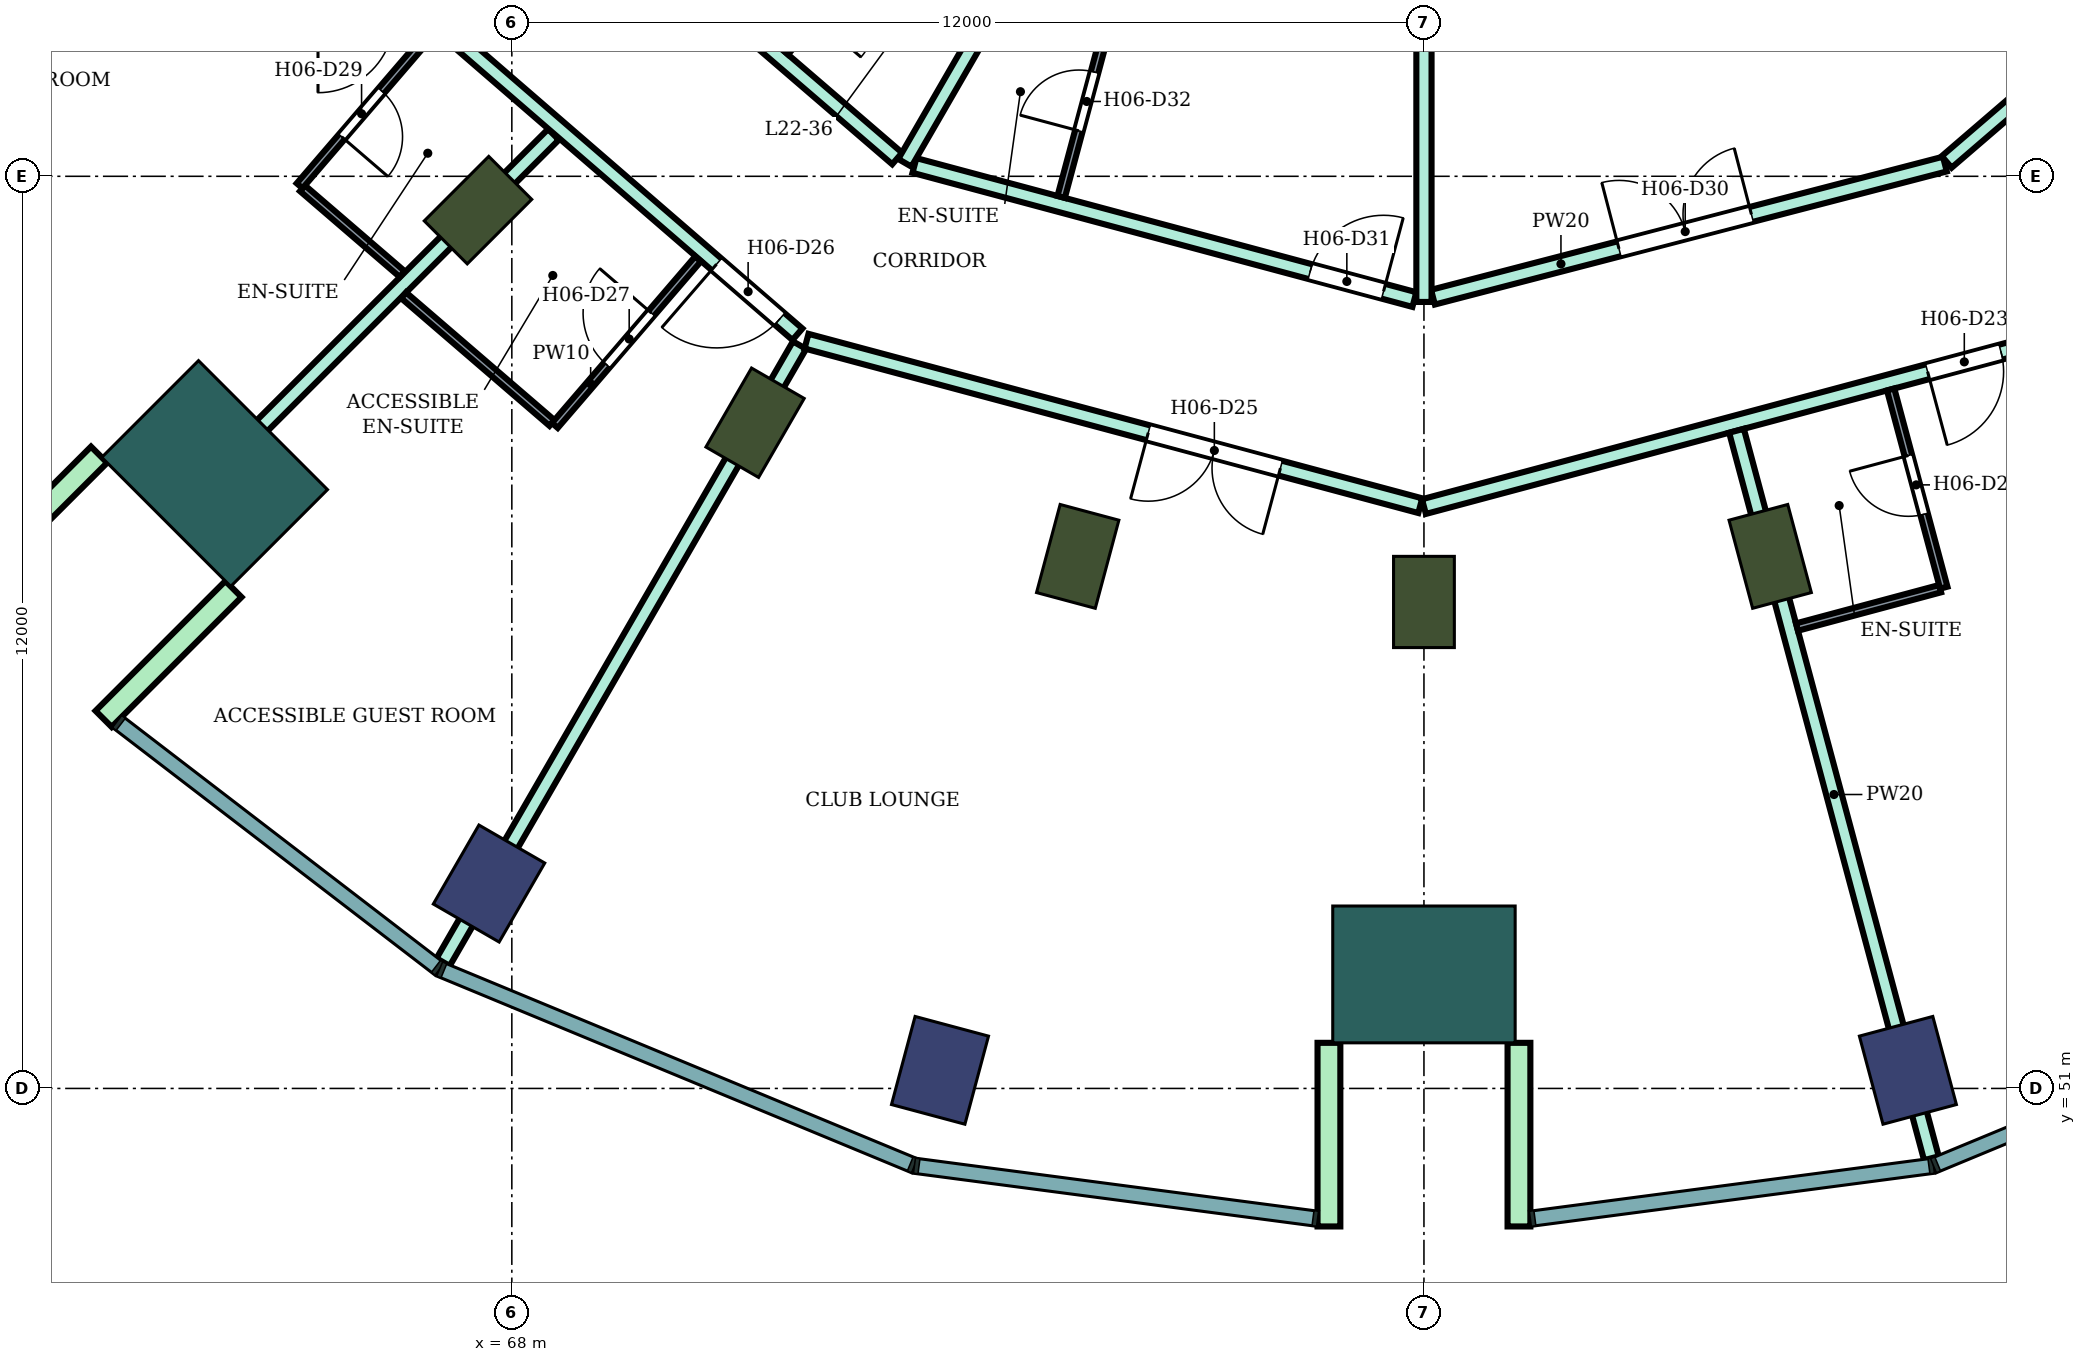
"""IFC4 building model, lengths in metres.
Left out: names, types, materials, properties, quantities, classifications, styles, units other than length and angle.
Written with IfcOpenShell. Run it as: python <this file> out.ifc"""

import sys

from ifc_helpers import new_model, si_unit, direction, frame, frame_2d, origin, origin_2d, place, context, subcontext, project, spatial, rectangle, extrude, element, fill, save


model = new_model("IFC4")
c1 = context("Model", 3, precision=1e-05, world=origin(), true_north=direction((0.0, 1.0)))
c2 = subcontext(c1, "Body", "Model", "MODEL_VIEW")
j1 = project(units=[si_unit("LENGTHUNIT", "METRE"), si_unit("PLANEANGLEUNIT", "RADIAN")], contexts=[c1])
p1 = place(None, origin())
s1 = spatial("IfcSite", under=j1, at=p1, CompositionType="ELEMENT")
p2 = place(p1, origin())
s2 = spatial("IfcBuilding", under=s1, at=p2, CompositionType="ELEMENT")
p3 = place(p2, frame((0.0, 0.0, 97.6)))
s3 = spatial("IfcBuildingStorey", under=s2, at=p3, CompositionType="ELEMENT", Elevation=97.6)
for number, where, z_axis, x_axis in (
    (1, (67.7, 53.696, 0.0), (0.0, 0.0, 1.0), (-0.5, -0.866, 0.0)),
    (2, (73.633, 51.238, 0.0), (0.0, 0.0, 1.0), (-0.259, -0.966, 0.0)),
    (3, (86.367, 51.238, 0.0), (0.0, 0.0, 1.0), (0.259, -0.966, 0.0)),
):
    element("IfcColumn", number, at=place(p3, frame(where, z_axis=z_axis, x_axis=x_axis)), inside=s3, PredefinedType="COLUMN", context=c2, shape_type="SweptSolid", body=[
        extrude(rectangle(XDim=1.2, YDim=1.0, at=origin_2d()), origin(), (0.0, 0.0, 1.0), 3.8),
    ])
for number, where, z_axis, x_axis in (
    (4, (67.555, 62.555, 0.0), (0.0, 0.0, 1.0), (-0.707, -0.707, 0.0)),
    (5, (71.2, 59.758, 0.0), (0.0, 0.0, 1.0), (-0.5, -0.866, 0.0)),
    (6, (75.445, 58.0, 0.0), (0.0, 0.0, 1.0), (-0.259, -0.966, 0.0)),
    (7, (80.0, 57.4, 0.0), (0.0, 0.0, 1.0), (0.0, -1.0, 0.0)),
    (8, (84.555, 58.0, 0.0), (0.0, 0.0, 1.0), (0.259, -0.966, 0.0)),
):
    element("IfcColumn", number, at=place(p3, frame(where, z_axis=z_axis, x_axis=x_axis)), inside=s3, PredefinedType="COLUMN", context=c2, shape_type="SweptSolid", body=[
        extrude(rectangle(XDim=1.2, YDim=0.8, at=origin_2d()), origin(), (0.0, 0.0, 1.0), 3.8),
    ])
for number, where, z_axis, x_axis in (
    (9, (64.09, 59.09, 0.0), (0.0, 0.0, 1.0), (-0.707, -0.707, 0.0)),
    (10, (80.0, 52.5, 0.0), (0.0, 0.0, 1.0), (0.0, -1.0, 0.0)),
):
    element("IfcColumn", number, at=place(p3, frame(where, z_axis=z_axis, x_axis=x_axis)), inside=s3, PredefinedType="COLUMN", context=c2, shape_type="SweptSolid", body=[
        extrude(rectangle(XDim=1.8, YDim=2.4, at=origin_2d()), origin(), (0.0, 0.0, 1.0), 3.8),
    ])
for number, where, z_axis, x_axis in (
    (11, (62.57, 59.338, 0.0), (0.0, 0.0, 1.0), (-0.707, -0.707, 0.0)),
    (12, (64.338, 57.57, 0.0), (0.0, 0.0, 1.0), (-0.707, -0.707, 0.0)),
    (13, (78.75, 51.6, 0.0), (0.0, 0.0, 1.0), (0.0, -1.0, 0.0)),
    (14, (81.25, 51.6, 0.0), (0.0, 0.0, 1.0), (0.0, -1.0, 0.0)),
):
    element("IfcWall", number, at=place(p3, frame(where, z_axis=z_axis, x_axis=x_axis)), inside=s3, PredefinedType="NOTDEFINED", context=c2, shape_type="SweptSolid", body=[
        extrude(rectangle(XDim=2.416, YDim=0.3, at=frame_2d((1.208, 0.0))), origin(), (0.0, 0.0, 1.0), 3.8),
    ])
p4 = place(p3, frame((63.594, 58.598, 0.0), z_axis=(0.0, 0.0, 1.0), x_axis=(0.707228748718, 0.706984792613, 0.0)))
e15 = element("IfcWall", 15, at=p4, inside=s3, PredefinedType="PARTITIONING", context=c2, shape_type="SweptSolid", body=[
    extrude(rectangle(XDim=7.005, YDim=0.2, at=frame_2d((3.503, 0.0))), origin(), (0.0, 0.0, 1.0), 3.35),
])
p5 = place(p3, frame((67.079, 64.968, 0.0), z_axis=(0.0, 0.0, 1.0), x_axis=(0.756371089567, -0.654142778656, 0.0)))
e16 = element("IfcWall", 16, at=p5, inside=s3, PredefinedType="PARTITIONING", context=c2, shape_type="SweptSolid", body=[
    extrude(rectangle(XDim=6.185, YDim=0.2, at=frame_2d((3.093, 0.0))), origin(), (0.0, 0.0, 1.0), 3.35),
])
p6 = place(p5, frame((4.778, 0.0, 0.0)))
e17 = element("IfcOpeningElement", 17, at=p6, cuts=e16, PredefinedType="OPENING", context=c2, shape_type="SweptSolid", body=[
    extrude(rectangle(XDim=1.1, YDim=2.1, at=frame_2d((0.55, 1.05))), frame((0.0, 0.11, 0.0), z_axis=(0.0, -1.0, 0.0), x_axis=(1.0, 0.0, 0.0)), (0.0, 0.0, 1.0), 0.22),
])
p7 = place(p3, frame((67.096, 52.662, 0.0), z_axis=(0.0, 0.0, 1.0), x_axis=(0.500222922337, 0.865896661253, 0.0)))
e18 = element("IfcWall", 18, at=p7, inside=s3, PredefinedType="PARTITIONING", context=c2, shape_type="SweptSolid", body=[
    extrude(rectangle(XDim=9.374, YDim=0.2, at=frame_2d((4.687, 0.0))), origin(), (0.0, 0.0, 1.0), 3.35),
])
p8 = place(p3, frame((69.158, 66.6, 0.0), z_axis=(0.0, 0.0, 1.0), x_axis=(0.757976058094, -0.652282373943, 0.0)))
e19 = element("IfcWall", 19, at=p8, inside=s3, PredefinedType="PARTITIONING", context=c2, shape_type="SweptSolid", body=[
    extrude(rectangle(XDim=5.16, YDim=0.2, at=frame_2d((2.58, 0.0))), origin(), (0.0, 0.0, 1.0), 3.35),
])
p9 = place(p8, frame((1.6, 0.0, 0.0)))
e20 = element("IfcOpeningElement", 20, at=p9, cuts=e19, PredefinedType="OPENING", context=c2, shape_type="SweptSolid", body=[
    extrude(rectangle(XDim=1.0, YDim=2.1, at=frame_2d((0.5, 1.05))), frame((0.0, 0.11, 0.0), z_axis=(0.0, -1.0, 0.0), x_axis=(1.0, 0.0, 0.0)), (0.0, 0.0, 1.0), 0.22),
])
p10 = place(p3, frame((71.877, 60.831, 0.0), z_axis=(0.0, 0.0, 1.0), x_axis=(0.965905026676, -0.258896657842, 0.0)))
e21 = element("IfcWall", 21, at=p10, inside=s3, PredefinedType="PARTITIONING", context=c2, shape_type="SweptSolid", body=[
    extrude(rectangle(XDim=8.36, YDim=0.2, at=frame_2d((4.18, 0.0))), origin(), (0.0, 0.0, 1.0), 3.35),
])
p11 = place(p10, frame((4.655, 0.0, 0.0)))
e22 = element("IfcOpeningElement", 22, at=p11, cuts=e21, PredefinedType="OPENING", context=c2, shape_type="SweptSolid", body=[
    extrude(rectangle(XDim=1.8, YDim=2.1, at=frame_2d((0.9, 1.05))), frame((0.0, 0.11, 0.0), z_axis=(0.0, -1.0, 0.0), x_axis=(1.0, 0.0, 0.0)), (0.0, 0.0, 1.0), 0.22),
])
p12 = place(p3, frame((73.297, 63.143, 0.0), z_axis=(0.0, 0.0, 1.0), x_axis=(0.965859030528, -0.25906820173, 0.0)))
e23 = element("IfcWall", 23, at=p12, inside=s3, PredefinedType="PARTITIONING", context=c2, shape_type="SweptSolid", body=[
    extrude(rectangle(XDim=6.81, YDim=0.2, at=frame_2d((3.405, 0.0))), origin(), (0.0, 0.0, 1.0), 3.35),
])
p13 = place(p12, frame((5.39, 0.0, 0.0)))
e24 = element("IfcOpeningElement", 24, at=p13, cuts=e23, PredefinedType="OPENING", context=c2, shape_type="SweptSolid", body=[
    extrude(rectangle(XDim=1.0, YDim=2.1, at=frame_2d((0.5, 1.05))), frame((0.0, 0.11, 0.0), z_axis=(0.0, -1.0, 0.0), x_axis=(1.0, 0.0, 0.0)), (0.0, 0.0, 1.0), 0.22),
])
p14 = place(p3, frame((73.171, 63.177, 0.0), z_axis=(0.0, 0.0, 1.0), x_axis=(0.500257106344, 0.865876912472, 0.0)))
e25 = element("IfcWall", 25, at=p14, inside=s3, PredefinedType="PARTITIONING", context=c2, shape_type="SweptSolid", body=[
    extrude(rectangle(XDim=5.955, YDim=0.2, at=frame_2d((2.978, 0.0))), origin(), (0.0, 0.0, 1.0), 3.35),
])
p15 = place(p3, frame((80.119, 61.41, 0.0), z_axis=(0.0, 0.0, 1.0), x_axis=(0.967823361235, 0.251630565408, 0.0)))
e26 = element("IfcWall", 26, at=p15, inside=s3, PredefinedType="PARTITIONING", context=c2, shape_type="SweptSolid", body=[
    extrude(rectangle(XDim=6.958, YDim=0.2, at=frame_2d((3.479, 0.0))), origin(), (0.0, 0.0, 1.0), 3.35),
])
p16 = place(p15, frame((2.529, 0.0, 0.0)))
e27 = element("IfcOpeningElement", 27, at=p16, cuts=e26, PredefinedType="OPENING", context=c2, shape_type="SweptSolid", body=[
    extrude(rectangle(XDim=1.8, YDim=2.1, at=frame_2d((0.9, 1.05))), frame((0.0, 0.11, 0.0), z_axis=(0.0, -1.0, 0.0), x_axis=(1.0, 0.0, 0.0)), (0.0, 0.0, 1.0), 0.22),
])
p17 = place(p3, frame((80.0, 58.655, 0.0), z_axis=(0.0, 0.0, 1.0), x_axis=(0.965967338894, 0.258664068224, 0.0)))
e28 = element("IfcWall", 28, at=p17, inside=s3, PredefinedType="PARTITIONING", context=c2, shape_type="SweptSolid", body=[
    extrude(rectangle(XDim=8.36, YDim=0.2, at=frame_2d((4.18, 0.0))), origin(), (0.0, 0.0, 1.0), 3.35),
])
p18 = place(p17, frame((6.86, 0.0, 0.0)))
e29 = element("IfcOpeningElement", 29, at=p18, cuts=e28, PredefinedType="OPENING", context=c2, shape_type="SweptSolid", body=[
    extrude(rectangle(XDim=1.0, YDim=2.1, at=frame_2d((0.5, 1.05))), frame((0.0, 0.11, 0.0), z_axis=(0.0, -1.0, 0.0), x_axis=(1.0, 0.0, 0.0)), (0.0, 0.0, 1.0), 0.22),
])
p19 = place(p3, frame((80.0, 61.347, 0.0), z_axis=(0.0, 0.0, 1.0), x_axis=(0.0, 1.0, 0.0)))
e30 = element("IfcWall", 30, at=p19, inside=s3, PredefinedType="PARTITIONING", context=c2, shape_type="SweptSolid", body=[
    extrude(rectangle(XDim=5.953, YDim=0.2, at=frame_2d((2.977, 0.0))), origin(), (0.0, 0.0, 1.0), 3.35),
])
p20 = place(p3, frame((84.112, 59.652, 0.0), z_axis=(0.0, 0.0, 1.0), x_axis=(0.258792739659, -0.965932874428, 0.0)))
e31 = element("IfcWall", 31, at=p20, inside=s3, PredefinedType="PARTITIONING", context=c2, shape_type="SweptSolid", body=[
    extrude(rectangle(XDim=9.908, YDim=0.2, at=frame_2d((4.954, 0.0))), origin(), (0.0, 0.0, 1.0), 3.35),
])
p21 = place(p3, frame((86.877, 63.189, 0.0), z_axis=(0.0, 0.0, 1.0), x_axis=(0.758088707506, 0.652151448325, 0.0)))
e32 = element("IfcWall", 32, at=p21, inside=s3, PredefinedType="PARTITIONING", context=c2, shape_type="SweptSolid", body=[
    extrude(rectangle(XDim=5.229, YDim=0.2, at=frame_2d((2.615, 0.0))), origin(), (0.0, 0.0, 1.0), 3.35),
])
p22 = place(p3, frame((65.246, 62.842, 0.0), z_axis=(0.0, 0.0, 1.0), x_axis=(0.758030338995, -0.652219292234, 0.0)))
e33 = element("IfcWall", 33, at=p22, inside=s3, PredefinedType="PARTITIONING", context=c2, shape_type="SweptSolid", body=[
    extrude(rectangle(XDim=1.73, YDim=0.1, at=frame_2d((0.865, 0.0))), origin(), (0.0, 0.0, 1.0), 3.35),
])
p23 = place(p3, frame((65.208, 62.875, 0.0), z_axis=(0.0, 0.0, 1.0), x_axis=(0.65205430601, 0.758172264076, 0.0)))
e34 = element("IfcWall", 34, at=p23, inside=s3, PredefinedType="PARTITIONING", context=c2, shape_type="SweptSolid", body=[
    extrude(rectangle(XDim=2.8, YDim=0.1, at=frame_2d((1.4, 0.0))), origin(), (0.0, 0.0, 1.0), 3.35),
])
p24 = place(p23, frame((0.85, 0.0, 0.0)))
e35 = element("IfcOpeningElement", 35, at=p24, cuts=e34, PredefinedType="OPENING", context=c2, shape_type="SweptSolid", body=[
    extrude(rectangle(XDim=0.8, YDim=2.1, at=frame_2d((0.4, 1.05))), frame((0.0, 0.06, 0.0), z_axis=(0.0, -1.0, 0.0), x_axis=(1.0, 0.0, 0.0)), (0.0, 0.0, 1.0), 0.12),
])
p25 = place(p3, frame((66.576, 61.435, 0.0), z_axis=(0.0, 0.0, 1.0), x_axis=(0.757970550281, -0.652288774169, 0.0)))
e36 = element("IfcWall", 36, at=p25, inside=s3, PredefinedType="PARTITIONING", context=c2, shape_type="SweptSolid", body=[
    extrude(rectangle(XDim=2.576, YDim=0.1, at=frame_2d((1.288, 0.0))), origin(), (0.0, 0.0, 1.0), 3.35),
])
p26 = place(p3, frame((68.566, 59.722, 0.0), z_axis=(0.0, 0.0, 1.0), x_axis=(0.65193146671, 0.758277892803, 0.0)))
e37 = element("IfcWall", 37, at=p26, inside=s3, PredefinedType="PARTITIONING", context=c2, shape_type="SweptSolid", body=[
    extrude(rectangle(XDim=2.89, YDim=0.1, at=frame_2d((1.445, 0.0))), origin(), (0.0, 0.0, 1.0), 3.35),
])
p27 = place(p26, frame((1.05, 0.0, 0.0)))
e38 = element("IfcOpeningElement", 38, at=p27, cuts=e37, PredefinedType="OPENING", context=c2, shape_type="SweptSolid", body=[
    extrude(rectangle(XDim=0.9, YDim=2.1, at=frame_2d((0.45, 1.05))), frame((0.0, 0.06, 0.0), z_axis=(0.0, -1.0, 0.0), x_axis=(1.0, 0.0, 0.0)), (0.0, 0.0, 1.0), 0.12),
])
p28 = place(p3, frame((71.596, 64.635, 0.0), z_axis=(0.0, 0.0, 1.0), x_axis=(0.652285007511, 0.757973791748, 0.0)))
e39 = element("IfcWall", 39, at=p28, inside=s3, PredefinedType="PARTITIONING", context=c2, shape_type="SweptSolid", body=[
    extrude(rectangle(XDim=2.65, YDim=0.1, at=frame_2d((1.325, 0.0))), origin(), (0.0, 0.0, 1.0), 3.35),
])
p29 = place(p28, frame((0.6, 0.0, 0.0)))
e40 = element("IfcOpeningElement", 40, at=p29, cuts=e39, PredefinedType="OPENING", context=c2, shape_type="SweptSolid", body=[
    extrude(rectangle(XDim=0.8, YDim=2.1, at=frame_2d((0.4, 1.05))), frame((0.0, 0.06, 0.0), z_axis=(0.0, -1.0, 0.0), x_axis=(1.0, 0.0, 0.0)), (0.0, 0.0, 1.0), 0.12),
])
p30 = place(p3, frame((75.227, 62.729, 0.0), z_axis=(0.0, 0.0, 1.0), x_axis=(0.258945475746, 0.965891940432, 0.0)))
e41 = element("IfcWall", 41, at=p30, inside=s3, PredefinedType="PARTITIONING", context=c2, shape_type="SweptSolid", body=[
    extrude(rectangle(XDim=2.7, YDim=0.1, at=frame_2d((1.35, 0.0))), origin(), (0.0, 0.0, 1.0), 3.35),
])
p31 = place(p30, frame((0.9, 0.0, 0.0)))
e42 = element("IfcOpeningElement", 42, at=p31, cuts=e41, PredefinedType="OPENING", context=c2, shape_type="SweptSolid", body=[
    extrude(rectangle(XDim=0.8, YDim=2.1, at=frame_2d((0.4, 1.05))), frame((0.0, 0.06, 0.0), z_axis=(0.0, -1.0, 0.0), x_axis=(1.0, 0.0, 0.0)), (0.0, 0.0, 1.0), 0.12),
])
p32 = place(p3, frame((84.908, 57.07, 0.0), z_axis=(0.0, 0.0, 1.0), x_axis=(0.965853538138, 0.25908867761, 0.0)))
e43 = element("IfcWall", 43, at=p32, inside=s3, PredefinedType="PARTITIONING", context=c2, shape_type="SweptSolid", body=[
    extrude(rectangle(XDim=1.95, YDim=0.1, at=frame_2d((0.975, 0.0))), origin(), (0.0, 0.0, 1.0), 3.35),
])
p33 = place(p3, frame((86.14, 60.196, 0.0), z_axis=(0.0, 0.0, 1.0), x_axis=(0.258945475746, -0.965891940432, 0.0)))
e44 = element("IfcWall", 44, at=p33, inside=s3, PredefinedType="PARTITIONING", context=c2, shape_type="SweptSolid", body=[
    extrude(rectangle(XDim=2.7, YDim=0.1, at=frame_2d((1.35, 0.0))), origin(), (0.0, 0.0, 1.0), 3.35),
])
p34 = place(p33, frame((0.9, 0.0, 0.0)))
e45 = element("IfcOpeningElement", 45, at=p34, cuts=e44, PredefinedType="OPENING", context=c2, shape_type="SweptSolid", body=[
    extrude(rectangle(XDim=0.8, YDim=2.1, at=frame_2d((0.4, 1.05))), frame((0.0, 0.06, 0.0), z_axis=(0.0, -1.0, 0.0), x_axis=(1.0, 0.0, 0.0)), (0.0, 0.0, 1.0), 0.12),
])
p35 = place(p18, frame((1.0, 0.0, 0.0), z_axis=(0.0, 0.0, 1.0), x_axis=(-1.0, 0.0, 0.0)))
e46 = element("IfcDoor", 46, at=p35, inside=s3, OperationType="SINGLE_SWING_RIGHT", PredefinedType="DOOR", context=c2, shape_type="SweptSolid", body=[
    extrude(rectangle(XDim=1.0, YDim=2.1, at=frame_2d((0.5, 1.05))), frame((0.0, 0.025, 0.0), z_axis=(0.0, -1.0, 0.0), x_axis=(1.0, 0.0, 0.0)), (0.0, 0.0, 1.0), 0.05),
])
fill(e29, e46)
p36 = place(p34, frame((0.8, 0.0, 0.0), z_axis=(0.0, 0.0, 1.0), x_axis=(-1.0, 0.0, 0.0)))
e47 = element("IfcDoor", 47, at=p36, inside=s3, OperationType="SINGLE_SWING_RIGHT", PredefinedType="DOOR", context=c2, shape_type="SweptSolid", body=[
    extrude(rectangle(XDim=0.8, YDim=2.1, at=frame_2d((0.4, 1.05))), frame((0.0, 0.025, 0.0), z_axis=(0.0, -1.0, 0.0), x_axis=(1.0, 0.0, 0.0)), (0.0, 0.0, 1.0), 0.05),
])
fill(e45, e47)
p37 = place(p11, frame((1.8, 0.0, 0.0), z_axis=(0.0, 0.0, 1.0), x_axis=(-1.0, 0.0, 0.0)))
e48 = element("IfcDoor", 48, at=p37, inside=s3, OperationType="DOUBLE_DOOR_SINGLE_SWING", PredefinedType="DOOR", context=c2, shape_type="SweptSolid", body=[
    extrude(rectangle(XDim=1.8, YDim=2.1, at=frame_2d((0.9, 1.05))), frame((0.0, 0.025, 0.0), z_axis=(0.0, -1.0, 0.0), x_axis=(1.0, 0.0, 0.0)), (0.0, 0.0, 1.0), 0.05),
])
fill(e22, e48)
p38 = place(p6, frame((1.1, 0.0, 0.0), z_axis=(0.0, 0.0, 1.0), x_axis=(-1.0, 0.0, 0.0)))
e49 = element("IfcDoor", 49, at=p38, inside=s3, OperationType="SINGLE_SWING_RIGHT", PredefinedType="DOOR", context=c2, shape_type="SweptSolid", body=[
    extrude(rectangle(XDim=1.1, YDim=2.1, at=frame_2d((0.55, 1.05))), frame((0.0, 0.025, 0.0), z_axis=(0.0, -1.0, 0.0), x_axis=(1.0, 0.0, 0.0)), (0.0, 0.0, 1.0), 0.05),
])
fill(e17, e49)
p39 = place(p27, origin())
e50 = element("IfcDoor", 50, at=p39, inside=s3, OperationType="SINGLE_SWING_RIGHT", PredefinedType="DOOR", context=c2, shape_type="SweptSolid", body=[
    extrude(rectangle(XDim=0.9, YDim=2.1, at=frame_2d((0.45, 1.05))), frame((0.0, 0.025, 0.0), z_axis=(0.0, -1.0, 0.0), x_axis=(1.0, 0.0, 0.0)), (0.0, 0.0, 1.0), 0.05),
])
fill(e38, e50)
p40 = place(p24, frame((0.8, 0.0, 0.0), z_axis=(0.0, 0.0, 1.0), x_axis=(-1.0, 0.0, 0.0)))
e51 = element("IfcDoor", 51, at=p40, inside=s3, OperationType="SINGLE_SWING_RIGHT", PredefinedType="DOOR", context=c2, shape_type="SweptSolid", body=[
    extrude(rectangle(XDim=0.8, YDim=2.1, at=frame_2d((0.4, 1.05))), frame((0.0, 0.025, 0.0), z_axis=(0.0, -1.0, 0.0), x_axis=(1.0, 0.0, 0.0)), (0.0, 0.0, 1.0), 0.05),
])
fill(e35, e51)
p41 = place(p16, origin())
e52 = element("IfcDoor", 52, at=p41, inside=s3, OperationType="DOUBLE_DOOR_SINGLE_SWING", PredefinedType="DOOR", context=c2, shape_type="SweptSolid", body=[
    extrude(rectangle(XDim=1.8, YDim=2.1, at=frame_2d((0.9, 1.05))), frame((0.0, 0.025, 0.0), z_axis=(0.0, -1.0, 0.0), x_axis=(1.0, 0.0, 0.0)), (0.0, 0.0, 1.0), 0.05),
])
fill(e27, e52)
p42 = place(p13, origin())
e53 = element("IfcDoor", 53, at=p42, inside=s3, OperationType="SINGLE_SWING_RIGHT", PredefinedType="DOOR", context=c2, shape_type="SweptSolid", body=[
    extrude(rectangle(XDim=1.0, YDim=2.1, at=frame_2d((0.5, 1.05))), frame((0.0, 0.025, 0.0), z_axis=(0.0, -1.0, 0.0), x_axis=(1.0, 0.0, 0.0)), (0.0, 0.0, 1.0), 0.05),
])
fill(e24, e53)
p43 = place(p31, origin())
e54 = element("IfcDoor", 54, at=p43, inside=s3, OperationType="SINGLE_SWING_LEFT", PredefinedType="DOOR", context=c2, shape_type="SweptSolid", body=[
    extrude(rectangle(XDim=0.8, YDim=2.1, at=frame_2d((0.4, 1.05))), frame((0.0, 0.025, 0.0), z_axis=(0.0, -1.0, 0.0), x_axis=(1.0, 0.0, 0.0)), (0.0, 0.0, 1.0), 0.05),
])
fill(e42, e54)
save(model, sys.argv[1])
